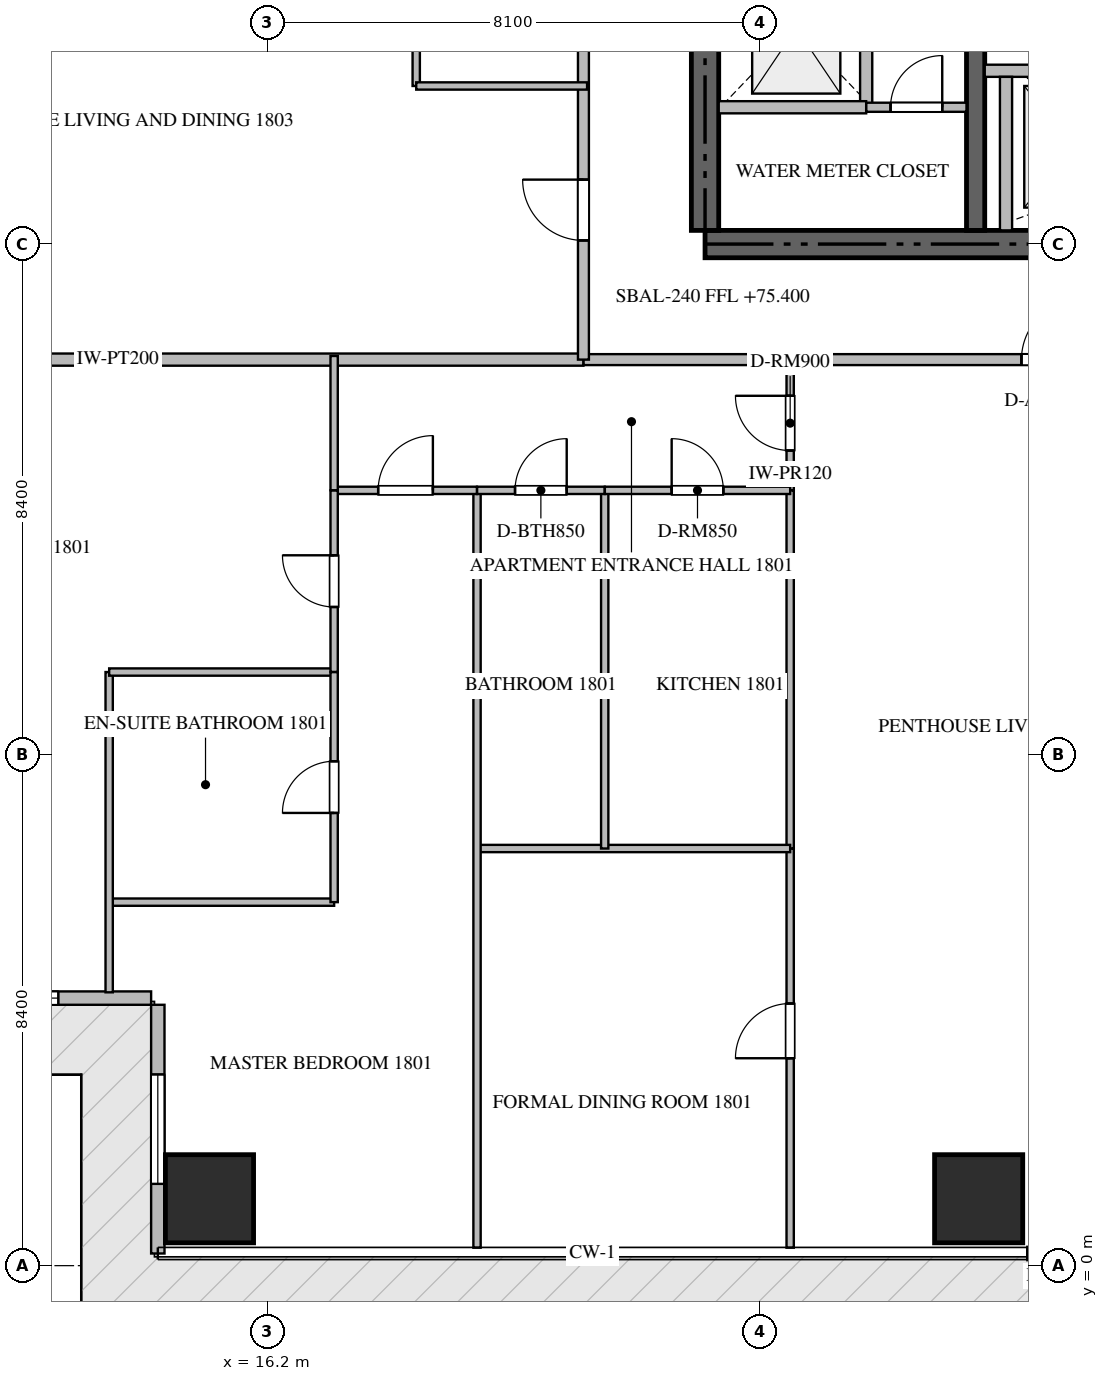
"""IFC4 building model, lengths in metres.
Left out: names, types, materials, properties, quantities, classifications, styles, units other than length and angle.
Written with IfcOpenShell. Run it as: python <this file> out.ifc"""

import sys

from ifc_helpers import new_model, si_unit, direction, frame, frame_2d, origin, origin_2d, place, context, subcontext, project, spatial, rectangle, extrude, source, transform, mapped, element, fill, save


model = new_model("IFC4")
c1 = context("Model", 3, precision=1e-05, world=origin(), true_north=direction((0.0, 1.0)))
c2 = subcontext(c1, "Body", "Model", "MODEL_VIEW")
j1 = project(units=[si_unit("LENGTHUNIT", "METRE"), si_unit("PLANEANGLEUNIT", "RADIAN")], contexts=[c1])
p1 = place(None, origin())
s1 = spatial("IfcSite", under=j1, at=p1, CompositionType="ELEMENT")
p2 = place(p1, origin())
s2 = spatial("IfcBuilding", under=s1, at=p2, CompositionType="ELEMENT")
p3 = place(p2, frame((0.0, 0.0, 75.45)))
s3 = spatial("IfcBuildingStorey", under=s2, at=p3, CompositionType="ELEMENT", Elevation=75.45)
p4 = place(p3, frame((23.4, 16.8, -0.26), z_axis=(0.0, 0.0, 1.0), x_axis=(1.0, 0.0, 0.0)))
e1 = element("IfcWall", 1, at=p4, inside=s3, PredefinedType="SHEAR", context=c2, shape_type="SweptSolid", body=[
    extrude(rectangle(XDim=18.0, YDim=0.45, at=frame_2d((9.0, 0.0))), origin(), (0.0, 0.0, 1.0), 3.748),
])
p5 = place(p3, frame((23.4, 17.025, -0.26), z_axis=(0.0, 0.0, 1.0), x_axis=(0.0, 1.0, 0.0)))
e2 = element("IfcWall", 2, at=p5, inside=s3, PredefinedType="SHEAR", context=c2, shape_type="SweptSolid", body=[
    extrude(rectangle(XDim=4.825, YDim=0.45, at=frame_2d((2.413, 0.0))), origin(), (0.0, 0.0, 1.0), 3.748),
])
p6 = place(p3, frame((27.85, 17.025, -0.26), z_axis=(0.0, 0.0, 1.0), x_axis=(0.0, 1.0, 0.0)))
e3 = element("IfcWall", 3, at=p6, inside=s3, PredefinedType="SHEAR", context=c2, shape_type="SweptSolid", body=[
    extrude(rectangle(XDim=4.825, YDim=0.3, at=frame_2d((2.413, 0.0))), origin(), (0.0, 0.0, 1.0), 3.748),
])
m1 = source(origin(), c2, "Body", "SweptSolid", [
    extrude(rectangle(XDim=1.45, YDim=1.45, at=origin_2d()), origin(), (0.0, 0.0, 1.0), 3.75),
])
for number, where, z_axis, x_axis in (
    (4, (15.25, 1.1, -0.26), (0.0, 0.0, 1.0), (1.0, 0.0, 0.0)),
    (5, (27.9, 1.1, -0.26), (0.0, 0.0, 1.0), (1.0, 0.0, 0.0)),
):
    element("IfcColumn", number, at=place(p3, frame(where, z_axis=z_axis, x_axis=x_axis)), inside=s3, PredefinedType="COLUMN", context=c2, shape_type="MappedRepresentation", body=[
        mapped(m1, transform((0.0, 0.0, 0.0), scale=1.0)),
    ])
p7 = place(p3, frame((10.31, 4.4, 0.0), z_axis=(0.0, 0.0, 1.0), x_axis=(1.0, 0.0, 0.0)))
e6 = element("IfcWall", 6, at=p7, inside=s3, PredefinedType="ELEMENTEDWALL", context=c2, shape_type="SweptSolid", body=[
    extrude(rectangle(XDim=3.98, YDim=0.22, at=frame_2d((1.99, 0.0))), origin(), (0.0, 0.0, 1.0), 3.475),
])
p8 = place(p7, frame((0.654, 0.0, 0.65)))
e7 = element("IfcOpeningElement", 7, at=p8, cuts=e6, PredefinedType="OPENING", context=c2, shape_type="SweptSolid", body=[
    extrude(rectangle(XDim=1.8, YDim=2.1, at=frame_2d((0.9, 1.05))), frame((0.0, 0.12, 0.0), z_axis=(0.0, -1.0, 0.0), x_axis=(1.0, 0.0, 0.0)), (0.0, 0.0, 1.0), 0.24),
])
p9 = place(p3, frame((14.4, 4.29, 0.0), z_axis=(0.0, 0.0, 1.0), x_axis=(0.0, -1.0, 0.0)))
e8 = element("IfcWall", 8, at=p9, inside=s3, PredefinedType="ELEMENTEDWALL", context=c2, shape_type="SweptSolid", body=[
    extrude(rectangle(XDim=4.09, YDim=0.22, at=frame_2d((2.045, 0.0))), origin(), (0.0, 0.0, 1.0), 3.475),
])
p10 = place(p9, frame((1.145, 0.0, 0.65)))
e9 = element("IfcOpeningElement", 9, at=p10, cuts=e8, PredefinedType="OPENING", context=c2, shape_type="SweptSolid", body=[
    extrude(rectangle(XDim=1.8, YDim=2.1, at=frame_2d((0.9, 1.05))), frame((0.0, 0.12, 0.0), z_axis=(0.0, -1.0, 0.0), x_axis=(1.0, 0.0, 0.0)), (0.0, 0.0, 1.0), 0.24),
])
p11 = place(p3, frame((28.0, 19.65, 0.0), z_axis=(0.0, 0.0, 1.0), x_axis=(1.0, 0.0, 0.0)))
e10 = element("IfcWall", 10, at=p11, inside=s3, PredefinedType="STANDARD", context=c2, shape_type="SweptSolid", body=[
    extrude(rectangle(XDim=2.65, YDim=0.2, at=frame_2d((1.325, 0.0))), origin(), (0.0, 0.0, 1.0), 3.49),
])
p12 = place(p11, frame((0.9, 0.0, 0.0)))
e11 = element("IfcOpeningElement", 11, at=p12, cuts=e10, PredefinedType="OPENING", context=c2, shape_type="SweptSolid", body=[
    extrude(rectangle(XDim=1.1, YDim=2.2, at=frame_2d((0.55, 1.1))), frame((0.0, 0.11, 0.0), z_axis=(0.0, -1.0, 0.0), x_axis=(1.0, 0.0, 0.0)), (0.0, 0.0, 1.0), 0.22),
])
p13 = place(p3, frame((28.35, 17.025, 0.0), z_axis=(0.0, 0.0, 1.0), x_axis=(0.0, 1.0, 0.0)))
e12 = element("IfcWall", 12, at=p13, inside=s3, PredefinedType="STANDARD", context=c2, shape_type="SweptSolid", body=[
    extrude(rectangle(XDim=2.525, YDim=0.2, at=frame_2d((1.263, 0.0))), origin(), (0.0, 0.0, 1.0), 3.49),
])
p14 = place(p3, frame((26.05, 19.05, 0.0), z_axis=(0.0, 0.0, 1.0), x_axis=(0.0, 1.0, 0.0)))
e13 = element("IfcWall", 13, at=p14, inside=s3, PredefinedType="STANDARD", context=c2, shape_type="SweptSolid", body=[
    extrude(rectangle(XDim=2.5, YDim=0.2, at=frame_2d((1.25, 0.0))), origin(), (0.0, 0.0, 1.0), 3.49),
])
p15 = place(p3, frame((23.625, 19.05, 0.0), z_axis=(0.0, 0.0, 1.0), x_axis=(1.0, 0.0, 0.0)))
e14 = element("IfcWall", 14, at=p15, inside=s3, PredefinedType="STANDARD", context=c2, shape_type="SweptSolid", body=[
    extrude(rectangle(XDim=2.425, YDim=0.2, at=frame_2d((1.212, 0.0))), origin(), (0.0, 0.0, 1.0), 3.49),
])
p16 = place(p3, frame((26.052, 19.05, 0.0), z_axis=(0.0, 0.0, 1.0), x_axis=(1.0, 0.0, 0.0)))
e15 = element("IfcWall", 15, at=p16, inside=s3, PredefinedType="PARTITIONING", context=c2, shape_type="SweptSolid", body=[
    extrude(rectangle(XDim=1.648, YDim=0.15, at=frame_2d((0.824, 0.0))), origin(), (0.0, 0.0, 1.0), 3.49),
])
p17 = place(p16, frame((0.399, 0.0, 0.0)))
e16 = element("IfcOpeningElement", 16, at=p17, cuts=e15, PredefinedType="OPENING", context=c2, shape_type="SweptSolid", body=[
    extrude(rectangle(XDim=0.85, YDim=2.1, at=frame_2d((0.425, 1.05))), frame((0.0, 0.085, 0.0), z_axis=(0.0, -1.0, 0.0), x_axis=(1.0, 0.0, 0.0)), (0.0, 0.0, 1.0), 0.17),
])
p18 = place(p3, frame((6.082, 14.9, 0.0), z_axis=(0.0, 0.0, 1.0), x_axis=(1.0, 0.0, 0.0)))
e17 = element("IfcWall", 17, at=p18, inside=s3, PredefinedType="PARTITIONING", context=c2, shape_type="SweptSolid", body=[
    extrude(rectangle(XDim=15.318, YDim=0.2, at=frame_2d((7.659, 0.0))), origin(), (0.0, 0.0, 1.0), 3.49),
])
p19 = place(p3, frame((21.402, 14.9, 0.0), z_axis=(0.0, 0.0, 1.0), x_axis=(1.0, 0.0, 0.0)))
e18 = element("IfcWall", 18, at=p19, inside=s3, PredefinedType="PARTITIONING", context=c2, shape_type="SweptSolid", body=[
    extrude(rectangle(XDim=21.996, YDim=0.18, at=frame_2d((10.998, 0.0))), origin(), (0.0, 0.0, 1.0), 3.49),
])
p20 = place(p19, frame((7.202, 0.0, 0.0)))
e19 = element("IfcOpeningElement", 19, at=p20, cuts=e18, PredefinedType="OPENING", context=c2, shape_type="SweptSolid", body=[
    extrude(rectangle(XDim=1.0, YDim=2.15, at=frame_2d((0.5, 1.075))), frame((0.0, 0.1, 0.0), z_axis=(0.0, -1.0, 0.0), x_axis=(1.0, 0.0, 0.0)), (0.0, 0.0, 1.0), 0.2),
])
p21 = place(p3, frame((21.4, 14.9, 0.0), z_axis=(0.0, 0.0, 1.0), x_axis=(0.0, 1.0, 0.0)))
e20 = element("IfcWall", 20, at=p21, inside=s3, PredefinedType="PARTITIONING", context=c2, shape_type="SweptSolid", body=[
    extrude(rectangle(XDim=20.6, YDim=0.18, at=frame_2d((10.3, 0.0))), origin(), (0.0, 0.0, 1.0), 3.49),
])
p22 = place(p21, frame((1.96, 0.0, 0.0)))
e21 = element("IfcOpeningElement", 21, at=p22, cuts=e20, PredefinedType="OPENING", context=c2, shape_type="SweptSolid", body=[
    extrude(rectangle(XDim=1.0, YDim=2.15, at=frame_2d((0.5, 1.075))), frame((0.0, 0.1, 0.0), z_axis=(0.0, -1.0, 0.0), x_axis=(1.0, 0.0, 0.0)), (0.0, 0.0, 1.0), 0.2),
])
p23 = place(p3, frame((24.8, 12.75, 0.0), z_axis=(0.0, 0.0, 1.0), x_axis=(0.0, 1.0, 0.0)))
e22 = element("IfcWall", 22, at=p23, inside=s3, PredefinedType="PARTITIONING", context=c2, shape_type="SweptSolid", body=[
    extrude(rectangle(XDim=2.21, YDim=0.12, at=frame_2d((1.105, 0.0))), origin(), (0.0, 0.0, 1.0), 3.49),
])
p24 = place(p23, frame((0.655, 0.0, 0.0)))
e23 = element("IfcOpeningElement", 23, at=p24, cuts=e22, PredefinedType="OPENING", context=c2, shape_type="SweptSolid", body=[
    extrude(rectangle(XDim=0.9, YDim=2.1, at=frame_2d((0.45, 1.05))), frame((0.0, 0.07, 0.0), z_axis=(0.0, -1.0, 0.0), x_axis=(1.0, 0.0, 0.0)), (0.0, 0.0, 1.0), 0.14),
])
p25 = place(p3, frame((24.8, 0.295, 0.0), z_axis=(0.0, 0.0, 1.0), x_axis=(0.0, 1.0, 0.0)))
e24 = element("IfcWall", 24, at=p25, inside=s3, PredefinedType="PARTITIONING", context=c2, shape_type="SweptSolid", body=[
    extrude(rectangle(XDim=6.565, YDim=0.12, at=frame_2d((3.283, 0.0))), origin(), (0.0, 0.0, 1.0), 3.49),
])
p26 = place(p25, frame((3.116, 0.0, 0.0)))
e25 = element("IfcOpeningElement", 25, at=p26, cuts=e24, PredefinedType="OPENING", context=c2, shape_type="SweptSolid", body=[
    extrude(rectangle(XDim=0.9, YDim=2.1, at=frame_2d((0.45, 1.05))), frame((0.0, 0.07, 0.0), z_axis=(0.0, -1.0, 0.0), x_axis=(1.0, 0.0, 0.0)), (0.0, 0.0, 1.0), 0.14),
])
p27 = place(p3, frame((24.8, 6.862, 0.0), z_axis=(0.0, 0.0, 1.0), x_axis=(0.0, 1.0, 0.0)))
e26 = element("IfcWall", 26, at=p27, inside=s3, PredefinedType="PARTITIONING", context=c2, shape_type="SweptSolid", body=[
    extrude(rectangle(XDim=5.886, YDim=0.12, at=frame_2d((2.943, 0.0))), origin(), (0.0, 0.0, 1.0), 3.49),
])
p28 = place(p3, frame((19.65, 6.86, 0.0), z_axis=(0.0, 0.0, 1.0), x_axis=(1.0, 0.0, 0.0)))
e27 = element("IfcWall", 27, at=p28, inside=s3, PredefinedType="PARTITIONING", context=c2, shape_type="SweptSolid", body=[
    extrude(rectangle(XDim=5.15, YDim=0.12, at=frame_2d((2.575, 0.0))), origin(), (0.0, 0.0, 1.0), 3.49),
])
p29 = place(p3, frame((19.65, 0.295, 0.0), z_axis=(0.0, 0.0, 1.0), x_axis=(0.0, 1.0, 0.0)))
e28 = element("IfcWall", 28, at=p29, inside=s3, PredefinedType="PARTITIONING", context=c2, shape_type="SweptSolid", body=[
    extrude(rectangle(XDim=12.455, YDim=0.12, at=frame_2d((6.228, 0.0))), origin(), (0.0, 0.0, 1.0), 3.49),
])
p30 = place(p3, frame((21.75, 6.86, 0.0), z_axis=(0.0, 0.0, 1.0), x_axis=(0.0, 1.0, 0.0)))
e29 = element("IfcWall", 29, at=p30, inside=s3, PredefinedType="PARTITIONING", context=c2, shape_type="SweptSolid", body=[
    extrude(rectangle(XDim=5.89, YDim=0.12, at=frame_2d((2.945, 0.0))), origin(), (0.0, 0.0, 1.0), 3.49),
])
p31 = place(p3, frame((19.65, 12.75, 0.0), z_axis=(0.0, 0.0, 1.0), x_axis=(1.0, 0.0, 0.0)))
e30 = element("IfcWall", 30, at=p31, inside=s3, PredefinedType="PARTITIONING", context=c2, shape_type="SweptSolid", body=[
    extrude(rectangle(XDim=2.1, YDim=0.12, at=frame_2d((1.05, 0.0))), origin(), (0.0, 0.0, 1.0), 3.49),
])
p32 = place(p31, frame((0.625, 0.0, 0.0)))
e31 = element("IfcOpeningElement", 31, at=p32, cuts=e30, PredefinedType="OPENING", context=c2, shape_type="SweptSolid", body=[
    extrude(rectangle(XDim=0.85, YDim=2.1, at=frame_2d((0.425, 1.05))), frame((0.0, 0.07, 0.0), z_axis=(0.0, -1.0, 0.0), x_axis=(1.0, 0.0, 0.0)), (0.0, 0.0, 1.0), 0.14),
])
p33 = place(p3, frame((21.752, 12.75, 0.0), z_axis=(0.0, 0.0, 1.0), x_axis=(1.0, 0.0, 0.0)))
e32 = element("IfcWall", 32, at=p33, inside=s3, PredefinedType="PARTITIONING", context=c2, shape_type="SweptSolid", body=[
    extrude(rectangle(XDim=3.048, YDim=0.12, at=frame_2d((1.524, 0.0))), origin(), (0.0, 0.0, 1.0), 3.49),
])
p34 = place(p33, frame((1.099, 0.0, 0.0)))
e33 = element("IfcOpeningElement", 33, at=p34, cuts=e32, PredefinedType="OPENING", context=c2, shape_type="SweptSolid", body=[
    extrude(rectangle(XDim=0.85, YDim=2.1, at=frame_2d((0.425, 1.05))), frame((0.0, 0.07, 0.0), z_axis=(0.0, -1.0, 0.0), x_axis=(1.0, 0.0, 0.0)), (0.0, 0.0, 1.0), 0.14),
])
p35 = place(p3, frame((17.3, 12.75, 0.0), z_axis=(0.0, 0.0, 1.0), x_axis=(1.0, 0.0, 0.0)))
e34 = element("IfcWall", 34, at=p35, inside=s3, PredefinedType="PARTITIONING", context=c2, shape_type="SweptSolid", body=[
    extrude(rectangle(XDim=2.348, YDim=0.12, at=frame_2d((1.174, 0.0))), origin(), (0.0, 0.0, 1.0), 3.49),
])
p36 = place(p35, frame((0.724, 0.0, 0.0)))
e35 = element("IfcOpeningElement", 35, at=p36, cuts=e34, PredefinedType="OPENING", context=c2, shape_type="SweptSolid", body=[
    extrude(rectangle(XDim=0.9, YDim=2.1, at=frame_2d((0.45, 1.05))), frame((0.0, 0.07, 0.0), z_axis=(0.0, -1.0, 0.0), x_axis=(1.0, 0.0, 0.0)), (0.0, 0.0, 1.0), 0.14),
])
p37 = place(p3, frame((13.6, 5.978, 0.0), z_axis=(0.0, 0.0, 1.0), x_axis=(1.0, 0.0, 0.0)))
e36 = element("IfcWall", 36, at=p37, inside=s3, PredefinedType="PARTITIONING", context=c2, shape_type="SweptSolid", body=[
    extrude(rectangle(XDim=3.7, YDim=0.12, at=frame_2d((1.85, 0.0))), origin(), (0.0, 0.0, 1.0), 3.49),
])
p38 = place(p3, frame((13.6, 4.495, 0.0), z_axis=(0.0, 0.0, 1.0), x_axis=(0.0, 1.0, 0.0)))
e37 = element("IfcWall", 37, at=p38, inside=s3, PredefinedType="PARTITIONING", context=c2, shape_type="SweptSolid", body=[
    extrude(rectangle(XDim=5.267, YDim=0.12, at=frame_2d((2.633, 0.0))), origin(), (0.0, 0.0, 1.0), 3.49),
])
p39 = place(p3, frame((13.6, 9.762, 0.0), z_axis=(0.0, 0.0, 1.0), x_axis=(1.0, 0.0, 0.0)))
e38 = element("IfcWall", 38, at=p39, inside=s3, PredefinedType="PARTITIONING", context=c2, shape_type="SweptSolid", body=[
    extrude(rectangle(XDim=3.7, YDim=0.12, at=frame_2d((1.85, 0.0))), origin(), (0.0, 0.0, 1.0), 3.49),
])
p40 = place(p3, frame((17.3, 5.978, 0.0), z_axis=(0.0, 0.0, 1.0), x_axis=(0.0, 1.0, 0.0)))
e39 = element("IfcWall", 39, at=p40, inside=s3, PredefinedType="PARTITIONING", context=c2, shape_type="SweptSolid", body=[
    extrude(rectangle(XDim=3.784, YDim=0.12, at=frame_2d((1.892, 0.0))), origin(), (0.0, 0.0, 1.0), 3.49),
])
p41 = place(p40, frame((1.467, 0.0, 0.0)))
e40 = element("IfcOpeningElement", 40, at=p41, cuts=e39, PredefinedType="OPENING", context=c2, shape_type="SweptSolid", body=[
    extrude(rectangle(XDim=0.85, YDim=2.1, at=frame_2d((0.425, 1.05))), frame((0.0, 0.07, 0.0), z_axis=(0.0, -1.0, 0.0), x_axis=(1.0, 0.0, 0.0)), (0.0, 0.0, 1.0), 0.14),
])
p42 = place(p3, frame((17.3, 9.764, 0.0), z_axis=(0.0, 0.0, 1.0), x_axis=(0.0, 1.0, 0.0)))
e41 = element("IfcWall", 41, at=p42, inside=s3, PredefinedType="PARTITIONING", context=c2, shape_type="SweptSolid", body=[
    extrude(rectangle(XDim=2.986, YDim=0.12, at=frame_2d((1.493, 0.0))), origin(), (0.0, 0.0, 1.0), 3.49),
])
p43 = place(p42, frame((1.068, 0.0, 0.0)))
e42 = element("IfcOpeningElement", 42, at=p43, cuts=e41, PredefinedType="OPENING", context=c2, shape_type="SweptSolid", body=[
    extrude(rectangle(XDim=0.85, YDim=2.1, at=frame_2d((0.425, 1.05))), frame((0.0, 0.07, 0.0), z_axis=(0.0, -1.0, 0.0), x_axis=(1.0, 0.0, 0.0)), (0.0, 0.0, 1.0), 0.14),
])
p44 = place(p3, frame((17.3, 12.752, 0.0), z_axis=(0.0, 0.0, 1.0), x_axis=(0.0, 1.0, 0.0)))
e43 = element("IfcWall", 43, at=p44, inside=s3, PredefinedType="PARTITIONING", context=c2, shape_type="SweptSolid", body=[
    extrude(rectangle(XDim=2.208, YDim=0.12, at=frame_2d((1.104, 0.0))), origin(), (0.0, 0.0, 1.0), 3.49),
])
p45 = place(p3, frame((18.65, 19.4, 0.0), z_axis=(0.0, 0.0, 1.0), x_axis=(0.0, 1.0, 0.0)))
e44 = element("IfcWall", 44, at=p45, inside=s3, PredefinedType="PARTITIONING", context=c2, shape_type="SweptSolid", body=[
    extrude(rectangle(XDim=3.33, YDim=0.12, at=frame_2d((1.665, 0.0))), origin(), (0.0, 0.0, 1.0), 3.49),
])
p46 = place(p45, frame((1.24, 0.0, 0.0)))
e45 = element("IfcOpeningElement", 45, at=p46, cuts=e44, PredefinedType="OPENING", context=c2, shape_type="SweptSolid", body=[
    extrude(rectangle(XDim=0.85, YDim=2.1, at=frame_2d((0.425, 1.05))), frame((0.0, 0.07, 0.0), z_axis=(0.0, -1.0, 0.0), x_axis=(1.0, 0.0, 0.0)), (0.0, 0.0, 1.0), 0.14),
])
p47 = place(p3, frame((18.65, 19.4, 0.0), z_axis=(0.0, 0.0, 1.0), x_axis=(1.0, 0.0, 0.0)))
e46 = element("IfcWall", 46, at=p47, inside=s3, PredefinedType="PARTITIONING", context=c2, shape_type="SweptSolid", body=[
    extrude(rectangle(XDim=2.81, YDim=0.12, at=frame_2d((1.405, 0.0))), origin(), (0.0, 0.0, 1.0), 3.49),
])
m2 = source(origin(), c2, "Body", "SweptSolid", [
    extrude(rectangle(XDim=1.8, YDim=2.1, at=frame_2d((0.9, 1.05))), frame((0.0, 0.03, 0.0), z_axis=(0.0, -1.0, 0.0), x_axis=(1.0, 0.0, 0.0)), (0.0, 0.0, 1.0), 0.06),
])
p48 = place(p8, origin())
e47 = element("IfcWindow", 47, at=p48, inside=s3, PartitioningType="SINGLE_PANEL", PredefinedType="WINDOW", context=c2, shape_type="MappedRepresentation", body=[
    mapped(m2, transform((0.0, 0.0, 0.0), scale=1.0)),
])
fill(e7, e47)
p49 = place(p10, origin())
e48 = element("IfcWindow", 48, at=p49, inside=s3, PartitioningType="SINGLE_PANEL", PredefinedType="WINDOW", context=c2, shape_type="MappedRepresentation", body=[
    mapped(m2, transform((0.0, 0.0, 0.0), scale=1.0)),
])
fill(e9, e48)
m3 = source(origin(), c2, "Body", "SweptSolid", [
    extrude(rectangle(XDim=0.85, YDim=2.1, at=frame_2d((0.425, 1.05))), frame((0.0, 0.025, 0.0), z_axis=(0.0, -1.0, 0.0), x_axis=(1.0, 0.0, 0.0)), (0.0, 0.0, 1.0), 0.05),
])
p50 = place(p17, origin())
e49 = element("IfcDoor", 49, at=p50, inside=s3, OperationType="SINGLE_SWING_RIGHT", PredefinedType="DOOR", context=c2, shape_type="MappedRepresentation", body=[
    mapped(m3, transform((0.0, 0.0, 0.0), scale=1.0)),
])
fill(e16, e49)
m4 = source(origin(), c2, "Body", "SweptSolid", [
    extrude(rectangle(XDim=1.0, YDim=2.15, at=frame_2d((0.5, 1.075))), frame((0.0, 0.025, 0.0), z_axis=(0.0, -1.0, 0.0), x_axis=(1.0, 0.0, 0.0)), (0.0, 0.0, 1.0), 0.05),
])
p51 = place(p20, origin())
e50 = element("IfcDoor", 50, at=p51, inside=s3, OperationType="SINGLE_SWING_RIGHT", PredefinedType="DOOR", context=c2, shape_type="MappedRepresentation", body=[
    mapped(m4, transform((0.0, 0.0, 0.0), scale=1.0)),
])
fill(e19, e50)
p52 = place(p22, origin())
e51 = element("IfcDoor", 51, at=p52, inside=s3, OperationType="SINGLE_SWING_RIGHT", PredefinedType="DOOR", context=c2, shape_type="MappedRepresentation", body=[
    mapped(m4, transform((0.0, 0.0, 0.0), scale=1.0)),
])
fill(e21, e51)
m5 = source(origin(), c2, "Body", "SweptSolid", [
    extrude(rectangle(XDim=0.9, YDim=2.1, at=frame_2d((0.45, 1.05))), frame((0.0, 0.025, 0.0), z_axis=(0.0, -1.0, 0.0), x_axis=(1.0, 0.0, 0.0)), (0.0, 0.0, 1.0), 0.05),
])
p53 = place(p24, origin())
e52 = element("IfcDoor", 52, at=p53, inside=s3, OperationType="SINGLE_SWING_RIGHT", PredefinedType="DOOR", context=c2, shape_type="MappedRepresentation", body=[
    mapped(m5, transform((0.0, 0.0, 0.0), scale=1.0)),
])
fill(e23, e52)
p54 = place(p26, origin())
e53 = element("IfcDoor", 53, at=p54, inside=s3, OperationType="SINGLE_SWING_LEFT", PredefinedType="DOOR", context=c2, shape_type="MappedRepresentation", body=[
    mapped(m5, transform((0.0, 0.0, 0.0), scale=1.0)),
])
fill(e25, e53)
p55 = place(p32, origin())
e54 = element("IfcDoor", 54, at=p55, inside=s3, OperationType="SINGLE_SWING_RIGHT", PredefinedType="DOOR", context=c2, shape_type="MappedRepresentation", body=[
    mapped(m3, transform((0.0, 0.0, 0.0), scale=1.0)),
])
fill(e31, e54)
p56 = place(p34, origin())
e55 = element("IfcDoor", 55, at=p56, inside=s3, OperationType="SINGLE_SWING_LEFT", PredefinedType="DOOR", context=c2, shape_type="MappedRepresentation", body=[
    mapped(m3, transform((0.0, 0.0, 0.0), scale=1.0)),
])
fill(e33, e55)
p57 = place(p36, origin())
e56 = element("IfcDoor", 56, at=p57, inside=s3, OperationType="SINGLE_SWING_RIGHT", PredefinedType="DOOR", context=c2, shape_type="MappedRepresentation", body=[
    mapped(m5, transform((0.0, 0.0, 0.0), scale=1.0)),
])
fill(e35, e56)
p58 = place(p41, origin())
e57 = element("IfcDoor", 57, at=p58, inside=s3, OperationType="SINGLE_SWING_LEFT", PredefinedType="DOOR", context=c2, shape_type="MappedRepresentation", body=[
    mapped(m3, transform((0.0, 0.0, 0.0), scale=1.0)),
])
fill(e40, e57)
p59 = place(p43, origin())
e58 = element("IfcDoor", 58, at=p59, inside=s3, OperationType="SINGLE_SWING_RIGHT", PredefinedType="DOOR", context=c2, shape_type="MappedRepresentation", body=[
    mapped(m3, transform((0.0, 0.0, 0.0), scale=1.0)),
])
fill(e42, e58)
save(model, sys.argv[1])
